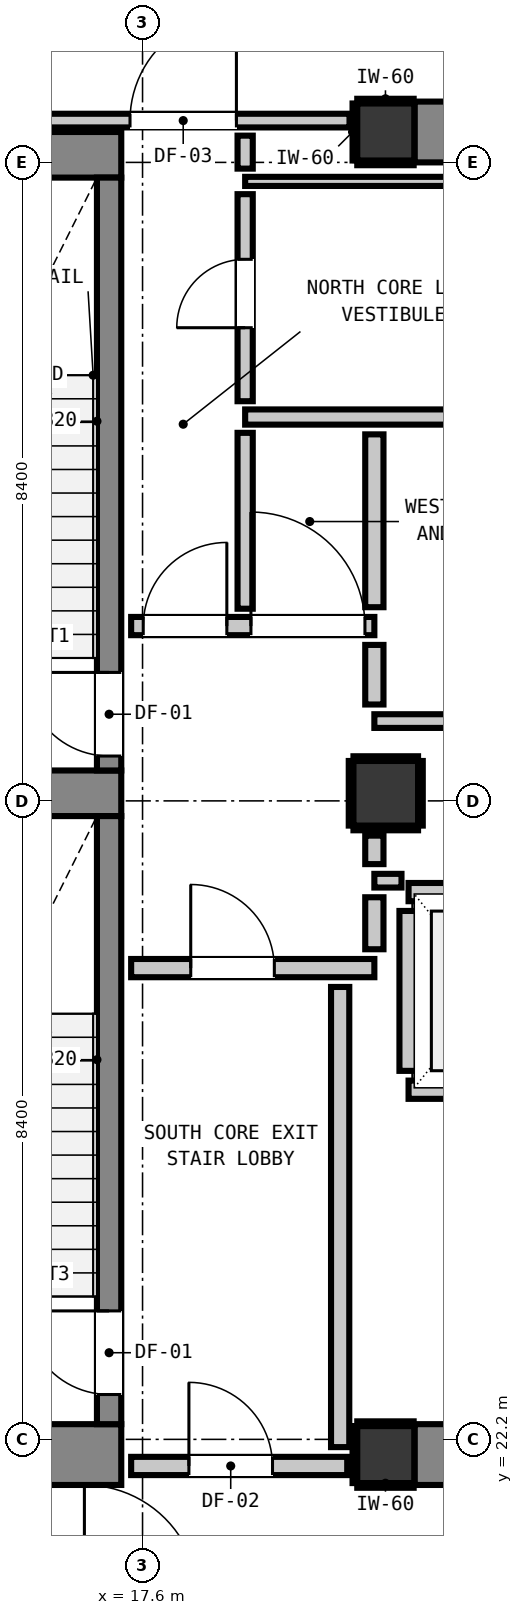
"""IFC4 building model, lengths in metres.
Left out: names, types, materials, properties, quantities, classifications, styles, units other than length and angle.
Written with IfcOpenShell. Run it as: python <this file> out.ifc"""

import sys

from ifc_helpers import new_model, si_unit, direction, frame, frame_2d, origin, origin_2d, place, context, subcontext, project, spatial, rectangle, extrude, element, fill, save


model = new_model("IFC4")
c1 = context("Model", 3, precision=1e-05, world=origin(), true_north=direction((0.0, 1.0)))
c2 = subcontext(c1, "Body", "Model", "MODEL_VIEW")
j1 = project(units=[si_unit("LENGTHUNIT", "METRE"), si_unit("PLANEANGLEUNIT", "RADIAN")], contexts=[c1])
p1 = place(None, origin())
s1 = spatial("IfcSite", under=j1, at=p1, CompositionType="ELEMENT")
p2 = place(p1, origin())
s2 = spatial("IfcBuilding", under=s1, at=p2, CompositionType="ELEMENT")
p3 = place(p2, frame((0.0, 0.0, 172.48)))
s3 = spatial("IfcBuildingStorey", under=s2, at=p3, CompositionType="ELEMENT", Elevation=172.48)
for number, where, z_axis, x_axis in (
    (1, (20.8, 22.0, 0.0), (0.0, 0.0, 1.0), (1.0, 0.0, 0.0)),
    (2, (20.8, 39.4, 0.0), (0.0, 0.0, 1.0), (1.0, 0.0, 0.0)),
):
    element("IfcColumn", number, at=place(p3, frame(where, z_axis=z_axis, x_axis=x_axis)), inside=s3, PredefinedType="COLUMN", context=c2, shape_type="SweptSolid", body=[
        extrude(rectangle(XDim=0.75, YDim=0.75, at=origin_2d()), origin(), (0.0, 0.0, 1.0), 4.4),
    ])
p4 = place(p3, frame((13.24, 22.0, 0.0), z_axis=(0.0, 0.0, 1.0), x_axis=(1.0, 0.0, 0.0)))
e3 = element("IfcWall", 3, at=p4, inside=s3, PredefinedType="SHEAR", context=c2, shape_type="SweptSolid", body=[
    extrude(rectangle(XDim=4.08, YDim=0.8, at=frame_2d((2.04, 0.0))), origin(), (0.0, 0.0, 1.0), 4.4),
])
p5 = place(p3, frame((13.24, 39.1, 0.0), z_axis=(0.0, 0.0, 1.0), x_axis=(1.0, 0.0, 0.0)))
e4 = element("IfcWall", 4, at=p5, inside=s3, PredefinedType="SHEAR", context=c2, shape_type="SweptSolid", body=[
    extrude(rectangle(XDim=4.08, YDim=0.6, at=frame_2d((2.04, 0.0))), origin(), (0.0, 0.0, 1.0), 4.4),
])
p6 = place(p3, frame((13.78, 30.7, 0.0), z_axis=(0.0, 0.0, 1.0), x_axis=(1.0, 0.0, 0.0)))
e5 = element("IfcWall", 5, at=p6, inside=s3, PredefinedType="SHEAR", context=c2, shape_type="SweptSolid", body=[
    extrude(rectangle(XDim=3.54, YDim=0.6, at=frame_2d((1.77, 0.0))), origin(), (0.0, 0.0, 1.0), 4.4),
])
for number, where, z_axis, x_axis in (
    (6, (21.18, 22.0, 0.0), (0.0, 0.0, 1.0), (1.0, 0.0, 0.0)),
    (7, (21.18, 39.4, 0.0), (0.0, 0.0, 1.0), (1.0, 0.0, 0.0)),
):
    element("IfcWall", number, at=place(p3, frame(where, z_axis=z_axis, x_axis=x_axis)), inside=s3, PredefinedType="SHEAR", context=c2, shape_type="SweptSolid", body=[
        extrude(rectangle(XDim=7.64, YDim=0.8, at=frame_2d((3.82, 0.0))), origin(), (0.0, 0.0, 1.0), 4.4),
    ])
p7 = place(p3, frame((17.16, 31.0, 0.0), z_axis=(0.0, 0.0, 1.0), x_axis=(0.0, 1.0, 0.0)))
e8 = element("IfcWall", 8, at=p7, inside=s3, PredefinedType="SHEAR", context=c2, shape_type="SweptSolid", body=[
    extrude(rectangle(XDim=7.8, YDim=0.32, at=frame_2d((3.9, 0.0))), origin(), (0.0, 0.0, 1.0), 4.4),
])
p8 = place(p7, frame((0.19, 0.0, 0.0)))
e9 = element("IfcOpeningElement", 9, at=p8, cuts=e8, PredefinedType="OPENING", context=c2, shape_type="SweptSolid", body=[
    extrude(rectangle(XDim=1.1, YDim=2.15, at=frame_2d((0.55, 1.075))), frame((0.0, 0.17, 0.0), z_axis=(0.0, -1.0, 0.0), x_axis=(1.0, 0.0, 0.0)), (0.0, 0.0, 1.0), 0.34),
])
p9 = place(p3, frame((17.16, 22.4, 0.0), z_axis=(0.0, 0.0, 1.0), x_axis=(0.0, 1.0, 0.0)))
e10 = element("IfcWall", 10, at=p9, inside=s3, PredefinedType="SHEAR", context=c2, shape_type="SweptSolid", body=[
    extrude(rectangle(XDim=8.0, YDim=0.32, at=frame_2d((4.0, 0.0))), origin(), (0.0, 0.0, 1.0), 4.4),
])
p10 = place(p9, frame((0.39, 0.0, 0.0)))
e11 = element("IfcOpeningElement", 11, at=p10, cuts=e10, PredefinedType="OPENING", context=c2, shape_type="SweptSolid", body=[
    extrude(rectangle(XDim=1.1, YDim=2.15, at=frame_2d((0.55, 1.075))), frame((0.0, 0.17, 0.0), z_axis=(0.0, -1.0, 0.0), x_axis=(1.0, 0.0, 0.0)), (0.0, 0.0, 1.0), 0.34),
])
p11 = place(p3, frame((20.8, 30.7, 0.0), z_axis=(0.0, 0.0, 1.0), x_axis=(1.0, 0.0, 0.0)))
e12 = element("IfcColumn", 12, at=p11, inside=s3, PredefinedType="COLUMN", context=c2, shape_type="SweptSolid", body=[
    extrude(rectangle(XDim=0.85, YDim=0.85, at=origin_2d()), origin(), (0.0, 0.0, 1.0), 4.4),
])
for number, where, z_axis, x_axis in (
    (13, (21.1, 26.8, 0.0), (0.0, 0.0, 1.0), (1.0, 0.0, 0.0)),
    (14, (21.1, 29.4, 0.0), (0.0, 0.0, 1.0), (1.0, 0.0, 0.0)),
):
    element("IfcWall", number, at=place(p3, frame(where, z_axis=z_axis, x_axis=x_axis)), inside=s3, PredefinedType="PARTITIONING", context=c2, shape_type="SweptSolid", body=[
        extrude(rectangle(XDim=2.2, YDim=0.24, at=frame_2d((1.1, 0.0))), origin(), (0.0, 0.0, 1.0), 4.16),
    ])
p12 = place(p3, frame((21.1, 27.048, 0.0), z_axis=(0.0, 0.0, 1.0), x_axis=(0.0, 1.0, 0.0)))
e15 = element("IfcWall", 15, at=p12, inside=s3, PredefinedType="PARTITIONING", context=c2, shape_type="SweptSolid", body=[
    extrude(rectangle(XDim=2.104, YDim=0.24, at=frame_2d((1.052, 0.0))), origin(), (0.0, 0.0, 1.0), 3.395),
])
p13 = place(p3, frame((17.45, 21.85, 0.0), z_axis=(0.0, 0.0, 1.0), x_axis=(1.0, 0.0, 0.0)))
e16 = element("IfcWall", 16, at=p13, inside=s3, PredefinedType="PARTITIONING", context=c2, shape_type="SweptSolid", body=[
    extrude(rectangle(XDim=2.843, YDim=0.24, at=frame_2d((1.421, 0.0))), origin(), (0.0, 0.0, 1.0), 3.842),
])
p14 = place(p13, frame((0.76, 0.0, 0.0)))
e17 = element("IfcOpeningElement", 17, at=p14, cuts=e16, PredefinedType="OPENING", context=c2, shape_type="SweptSolid", body=[
    extrude(rectangle(XDim=1.1, YDim=2.15, at=frame_2d((0.55, 1.075))), frame((0.0, 0.13, 0.0), z_axis=(0.0, -1.0, 0.0), x_axis=(1.0, 0.0, 0.0)), (0.0, 0.0, 1.0), 0.26),
])
p15 = place(p3, frame((17.45, 28.4, 0.0), z_axis=(0.0, 0.0, 1.0), x_axis=(1.0, 0.0, 0.0)))
e18 = element("IfcWall", 18, at=p15, inside=s3, PredefinedType="PARTITIONING", context=c2, shape_type="SweptSolid", body=[
    extrude(rectangle(XDim=3.2, YDim=0.24, at=frame_2d((1.6, 0.0))), origin(), (0.0, 0.0, 1.0), 4.16),
])
p16 = place(p15, frame((0.784, 0.0, 0.0)))
e19 = element("IfcOpeningElement", 19, at=p16, cuts=e18, PredefinedType="OPENING", context=c2, shape_type="SweptSolid", body=[
    extrude(rectangle(XDim=1.1, YDim=2.15, at=frame_2d((0.55, 1.075))), frame((0.0, 0.13, 0.0), z_axis=(0.0, -1.0, 0.0), x_axis=(1.0, 0.0, 0.0)), (0.0, 0.0, 1.0), 0.26),
])
p17 = place(p3, frame((17.45, 32.9, 0.0), z_axis=(0.0, 0.0, 1.0), x_axis=(1.0, 0.0, 0.0)))
e20 = element("IfcWall", 20, at=p17, inside=s3, PredefinedType="PARTITIONING", context=c2, shape_type="SweptSolid", body=[
    extrude(rectangle(XDim=3.2, YDim=0.24, at=frame_2d((1.6, 0.0))), origin(), (0.0, 0.0, 1.0), 4.16),
])
p18 = place(p17, frame((0.159, 0.0, 0.0)))
e21 = element("IfcOpeningElement", 21, at=p18, cuts=e20, PredefinedType="OPENING", context=c2, shape_type="SweptSolid", body=[
    extrude(rectangle(XDim=1.1, YDim=2.15, at=frame_2d((0.55, 1.075))), frame((0.0, 0.13, 0.0), z_axis=(0.0, -1.0, 0.0), x_axis=(1.0, 0.0, 0.0)), (0.0, 0.0, 1.0), 0.26),
])
p19 = place(p17, frame((1.576, 0.0, 0.0)))
e22 = element("IfcOpeningElement", 22, at=p19, cuts=e20, PredefinedType="OPENING", context=c2, shape_type="SweptSolid", body=[
    extrude(rectangle(XDim=1.5, YDim=2.15, at=frame_2d((0.75, 1.075))), frame((0.0, 0.13, 0.0), z_axis=(0.0, -1.0, 0.0), x_axis=(1.0, 0.0, 0.0)), (0.0, 0.0, 1.0), 0.26),
])
p20 = place(p3, frame((18.95, 35.65, 0.0), z_axis=(0.0, 0.0, 1.0), x_axis=(1.0, 0.0, 0.0)))
e23 = element("IfcWall", 23, at=p20, inside=s3, PredefinedType="PARTITIONING", context=c2, shape_type="SweptSolid", body=[
    extrude(rectangle(XDim=11.025, YDim=0.2, at=frame_2d((5.513, 0.0))), origin(), (0.0, 0.0, 1.0), 4.16),
])
p21 = place(p3, frame((20.65, 29.55, 0.0), z_axis=(0.0, 0.0, 1.0), x_axis=(1.0, 0.0, 0.0)))
e24 = element("IfcWall", 24, at=p21, inside=s3, PredefinedType="PARTITIONING", context=c2, shape_type="SweptSolid", body=[
    extrude(rectangle(XDim=0.357, YDim=0.18, at=frame_2d((0.179, 0.0))), origin(), (0.0, 0.0, 1.0), 4.16),
])
p22 = place(p3, frame((20.65, 31.65, 0.0), z_axis=(0.0, 0.0, 1.0), x_axis=(1.0, 0.0, 0.0)))
e25 = element("IfcWall", 25, at=p22, inside=s3, PredefinedType="PARTITIONING", context=c2, shape_type="SweptSolid", body=[
    extrude(rectangle(XDim=7.91, YDim=0.18, at=frame_2d((3.955, 0.0))), origin(), (0.0, 0.0, 1.0), 4.16),
])
p23 = place(p3, frame((10.8, 39.55, 0.0), z_axis=(0.0, 0.0, 1.0), x_axis=(1.0, 0.0, 0.0)))
e26 = element("IfcWall", 26, at=p23, inside=s3, PredefinedType="PARTITIONING", context=c2, shape_type="SweptSolid", body=[
    extrude(rectangle(XDim=9.523, YDim=0.18, at=frame_2d((4.761, 0.0))), origin(), (0.0, 0.0, 1.0), 3.842),
])
p24 = place(p23, frame((6.635, 0.0, 0.0)))
e27 = element("IfcOpeningElement", 27, at=p24, cuts=e26, PredefinedType="OPENING", context=c2, shape_type="SweptSolid", body=[
    extrude(rectangle(XDim=1.4, YDim=2.15, at=frame_2d((0.7, 1.075))), frame((0.0, 0.1, 0.0), z_axis=(0.0, -1.0, 0.0), x_axis=(1.0, 0.0, 0.0)), (0.0, 0.0, 1.0), 0.2),
])
p25 = place(p23, frame((0.199, 0.0, 0.0)))
e28 = element("IfcOpeningElement", 28, at=p25, cuts=e26, PredefinedType="OPENING", context=c2, shape_type="SweptSolid", body=[
    extrude(rectangle(XDim=1.4, YDim=2.15, at=frame_2d((0.7, 1.075))), frame((0.0, 0.1, 0.0), z_axis=(0.0, -1.0, 0.0), x_axis=(1.0, 0.0, 0.0)), (0.0, 0.0, 1.0), 0.2),
])
p26 = place(p3, frame((18.95, 38.75, 0.0), z_axis=(0.0, 0.0, 1.0), x_axis=(1.0, 0.0, 0.0)))
e29 = element("IfcWall", 29, at=p26, inside=s3, PredefinedType="PARTITIONING", context=c2, shape_type="SweptSolid", body=[
    extrude(rectangle(XDim=13.56, YDim=0.12, at=frame_2d((6.78, 0.0))), origin(), (0.0, 0.0, 1.0), 4.16),
])
p27 = place(p3, frame((20.2, 22.098, 0.0), z_axis=(0.0, 0.0, 1.0), x_axis=(0.0, 1.0, 0.0)))
e30 = element("IfcWall", 30, at=p27, inside=s3, PredefinedType="PARTITIONING", context=c2, shape_type="SweptSolid", body=[
    extrude(rectangle(XDim=6.054, YDim=0.24, at=frame_2d((3.027, 0.0))), origin(), (0.0, 0.0, 1.0), 4.16),
])
p28 = place(p3, frame((20.65, 28.648, 0.0), z_axis=(0.0, 0.0, 1.0), x_axis=(0.0, 1.0, 0.0)))
e31 = element("IfcWall", 31, at=p28, inside=s3, PredefinedType="PARTITIONING", context=c2, shape_type="SweptSolid", body=[
    extrude(rectangle(XDim=0.684, YDim=0.24, at=frame_2d((0.342, 0.0))), origin(), (0.0, 0.0, 1.0), 3.395),
])
p29 = place(p3, frame((20.65, 29.768, 0.0), z_axis=(0.0, 0.0, 1.0), x_axis=(0.0, 1.0, 0.0)))
e32 = element("IfcWall", 32, at=p29, inside=s3, PredefinedType="PARTITIONING", context=c2, shape_type="SweptSolid", body=[
    extrude(rectangle(XDim=0.375, YDim=0.24, at=frame_2d((0.188, 0.0))), origin(), (0.0, 0.0, 1.0), 3.395),
])
p30 = place(p3, frame((20.65, 31.868, 0.0), z_axis=(0.0, 0.0, 1.0), x_axis=(0.0, 1.0, 0.0)))
e33 = element("IfcWall", 33, at=p30, inside=s3, PredefinedType="PARTITIONING", context=c2, shape_type="SweptSolid", body=[
    extrude(rectangle(XDim=0.784, YDim=0.24, at=frame_2d((0.392, 0.0))), origin(), (0.0, 0.0, 1.0), 3.395),
])
p31 = place(p3, frame((20.65, 33.148, 0.0), z_axis=(0.0, 0.0, 1.0), x_axis=(0.0, 1.0, 0.0)))
e34 = element("IfcWall", 34, at=p31, inside=s3, PredefinedType="PARTITIONING", context=c2, shape_type="SweptSolid", body=[
    extrude(rectangle(XDim=2.274, YDim=0.24, at=frame_2d((1.137, 0.0))), origin(), (0.0, 0.0, 1.0), 3.395),
])
p32 = place(p3, frame((18.95, 33.128, 0.0), z_axis=(0.0, 0.0, 1.0), x_axis=(0.0, 1.0, 0.0)))
e35 = element("IfcWall", 35, at=p32, inside=s3, PredefinedType="PARTITIONING", context=c2, shape_type="SweptSolid", body=[
    extrude(rectangle(XDim=2.314, YDim=0.2, at=frame_2d((1.157, 0.0))), origin(), (0.0, 0.0, 1.0), 4.16),
])
p33 = place(p3, frame((18.95, 35.858, 0.0), z_axis=(0.0, 0.0, 1.0), x_axis=(0.0, 1.0, 0.0)))
e36 = element("IfcWall", 36, at=p33, inside=s3, PredefinedType="PARTITIONING", context=c2, shape_type="SweptSolid", body=[
    extrude(rectangle(XDim=2.724, YDim=0.2, at=frame_2d((1.362, 0.0))), origin(), (0.0, 0.0, 1.0), 4.16),
])
p34 = place(p33, frame((0.967, 0.0, 0.0)))
e37 = element("IfcOpeningElement", 37, at=p34, cuts=e36, PredefinedType="OPENING", context=c2, shape_type="SweptSolid", body=[
    extrude(rectangle(XDim=0.9, YDim=2.1, at=frame_2d((0.45, 1.05))), frame((0.0, 0.11, 0.0), z_axis=(0.0, -1.0, 0.0), x_axis=(1.0, 0.0, 0.0)), (0.0, 0.0, 1.0), 0.22),
])
p35 = place(p3, frame((18.95, 38.918, 0.0), z_axis=(0.0, 0.0, 1.0), x_axis=(0.0, 1.0, 0.0)))
e38 = element("IfcWall", 38, at=p35, inside=s3, PredefinedType="PARTITIONING", context=c2, shape_type="SweptSolid", body=[
    extrude(rectangle(XDim=0.434, YDim=0.2, at=frame_2d((0.217, 0.0))), origin(), (0.0, 0.0, 1.0), 4.16),
])
for number, where, z_axis, x_axis in (
    (39, (20.425, 21.593, 0.0), (0.0, 0.0, 1.0), (1.0, 0.0, 0.0)),
    (40, (20.425, 22.407, 0.0), (0.0, 0.0, 1.0), (1.0, 0.0, 0.0)),
):
    element("IfcWall", number, at=place(p3, frame(where, z_axis=z_axis, x_axis=x_axis)), inside=s3, PredefinedType="PARTITIONING", context=c2, shape_type="SweptSolid", body=[
        extrude(rectangle(XDim=0.742, YDim=0.06, at=frame_2d((0.371, 0.0))), origin(), (0.0, 0.0, 1.0), 1.45),
    ])
p36 = place(p3, frame((20.393, 21.625, 0.0), z_axis=(0.0, 0.0, 1.0), x_axis=(0.0, 1.0, 0.0)))
e41 = element("IfcWall", 41, at=p36, inside=s3, PredefinedType="PARTITIONING", context=c2, shape_type="SweptSolid", body=[
    extrude(rectangle(XDim=0.75, YDim=0.06, at=frame_2d((0.375, 0.0))), origin(), (0.0, 0.0, 1.0), 1.45),
])
for number, where, z_axis, x_axis in (
    (42, (20.425, 38.993, 0.0), (0.0, 0.0, 1.0), (1.0, 0.0, 0.0)),
    (43, (20.425, 39.807, 0.0), (0.0, 0.0, 1.0), (1.0, 0.0, 0.0)),
):
    element("IfcWall", number, at=place(p3, frame(where, z_axis=z_axis, x_axis=x_axis)), inside=s3, PredefinedType="PARTITIONING", context=c2, shape_type="SweptSolid", body=[
        extrude(rectangle(XDim=0.742, YDim=0.06, at=frame_2d((0.371, 0.0))), origin(), (0.0, 0.0, 1.0), 1.45),
    ])
p37 = place(p3, frame((20.393, 39.025, 0.0), z_axis=(0.0, 0.0, 1.0), x_axis=(0.0, 1.0, 0.0)))
e44 = element("IfcWall", 44, at=p37, inside=s3, PredefinedType="PARTITIONING", context=c2, shape_type="SweptSolid", body=[
    extrude(rectangle(XDim=0.75, YDim=0.06, at=frame_2d((0.375, 0.0))), origin(), (0.0, 0.0, 1.0), 1.45),
])
for number, where, z_axis, x_axis in (
    (45, (20.375, 30.243, 0.0), (0.0, 0.0, 1.0), (1.0, 0.0, 0.0)),
    (46, (20.375, 31.157, 0.0), (0.0, 0.0, 1.0), (1.0, 0.0, 0.0)),
    (47, (20.343, 30.275, 0.0), (0.0, 0.0, 1.0), (0.0, 1.0, 0.0)),
    (48, (21.257, 30.275, 0.0), (0.0, 0.0, 1.0), (0.0, 1.0, 0.0)),
):
    element("IfcWall", number, at=place(p3, frame(where, z_axis=z_axis, x_axis=x_axis)), inside=s3, PredefinedType="PARTITIONING", context=c2, shape_type="SweptSolid", body=[
        extrude(rectangle(XDim=0.85, YDim=0.06, at=frame_2d((0.425, 0.0))), origin(), (0.0, 0.0, 1.0), 1.45),
    ])
p38 = place(p8, origin())
e49 = element("IfcDoor", 49, at=p38, inside=s3, OperationType="SINGLE_SWING_RIGHT", PredefinedType="DOOR", context=c2, shape_type="SweptSolid", body=[
    extrude(rectangle(XDim=1.1, YDim=2.15, at=frame_2d((0.55, 1.075))), frame((0.0, 0.025, 0.0), z_axis=(0.0, -1.0, 0.0), x_axis=(1.0, 0.0, 0.0)), (0.0, 0.0, 1.0), 0.05),
])
fill(e9, e49)
p39 = place(p10, origin())
e50 = element("IfcDoor", 50, at=p39, inside=s3, OperationType="SINGLE_SWING_RIGHT", PredefinedType="DOOR", context=c2, shape_type="SweptSolid", body=[
    extrude(rectangle(XDim=1.1, YDim=2.15, at=frame_2d((0.55, 1.075))), frame((0.0, 0.025, 0.0), z_axis=(0.0, -1.0, 0.0), x_axis=(1.0, 0.0, 0.0)), (0.0, 0.0, 1.0), 0.05),
])
fill(e11, e50)
p40 = place(p16, origin())
e51 = element("IfcDoor", 51, at=p40, inside=s3, OperationType="SINGLE_SWING_LEFT", PredefinedType="DOOR", context=c2, shape_type="SweptSolid", body=[
    extrude(rectangle(XDim=1.1, YDim=2.15, at=frame_2d((0.55, 1.075))), frame((0.0, 0.025, 0.0), z_axis=(0.0, -1.0, 0.0), x_axis=(1.0, 0.0, 0.0)), (0.0, 0.0, 1.0), 0.05),
])
fill(e19, e51)
p41 = place(p18, origin())
e52 = element("IfcDoor", 52, at=p41, inside=s3, OperationType="SINGLE_SWING_RIGHT", PredefinedType="DOOR", context=c2, shape_type="SweptSolid", body=[
    extrude(rectangle(XDim=1.1, YDim=2.15, at=frame_2d((0.55, 1.075))), frame((0.0, 0.025, 0.0), z_axis=(0.0, -1.0, 0.0), x_axis=(1.0, 0.0, 0.0)), (0.0, 0.0, 1.0), 0.05),
])
fill(e21, e52)
p42 = place(p14, origin())
e53 = element("IfcDoor", 53, at=p42, inside=s3, OperationType="SINGLE_SWING_LEFT", PredefinedType="DOOR", context=c2, shape_type="SweptSolid", body=[
    extrude(rectangle(XDim=1.1, YDim=2.15, at=frame_2d((0.55, 1.075))), frame((0.0, 0.025, 0.0), z_axis=(0.0, -1.0, 0.0), x_axis=(1.0, 0.0, 0.0)), (0.0, 0.0, 1.0), 0.05),
])
fill(e17, e53)
p43 = place(p24, origin())
e54 = element("IfcDoor", 54, at=p43, inside=s3, OperationType="SINGLE_SWING_RIGHT", PredefinedType="DOOR", context=c2, shape_type="SweptSolid", body=[
    extrude(rectangle(XDim=1.4, YDim=2.15, at=frame_2d((0.7, 1.075))), frame((0.0, 0.025, 0.0), z_axis=(0.0, -1.0, 0.0), x_axis=(1.0, 0.0, 0.0)), (0.0, 0.0, 1.0), 0.05),
])
fill(e27, e54)
p44 = place(p19, origin())
e55 = element("IfcDoor", 55, at=p44, inside=s3, OperationType="SINGLE_SWING_LEFT", PredefinedType="DOOR", context=c2, shape_type="SweptSolid", body=[
    extrude(rectangle(XDim=1.5, YDim=2.15, at=frame_2d((0.75, 1.075))), frame((0.0, 0.025, 0.0), z_axis=(0.0, -1.0, 0.0), x_axis=(1.0, 0.0, 0.0)), (0.0, 0.0, 1.0), 0.05),
])
fill(e22, e55)
p45 = place(p34, origin())
e56 = element("IfcDoor", 56, at=p45, inside=s3, OperationType="SINGLE_SWING_LEFT", PredefinedType="DOOR", context=c2, shape_type="SweptSolid", body=[
    extrude(rectangle(XDim=0.9, YDim=2.1, at=frame_2d((0.45, 1.05))), frame((0.0, 0.025, 0.0), z_axis=(0.0, -1.0, 0.0), x_axis=(1.0, 0.0, 0.0)), (0.0, 0.0, 1.0), 0.05),
])
fill(e37, e56)
save(model, sys.argv[1])
